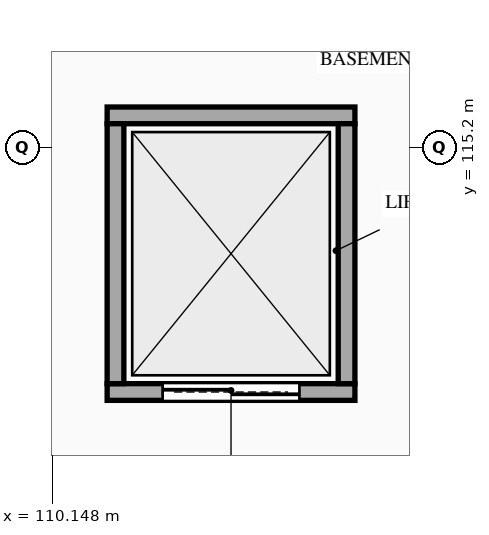
"""IFC4 building model, lengths in metres.
Left out: names, types, materials, properties, quantities, classifications, styles, units other than length and angle.
Written with IfcOpenShell. Run it as: python <this file> out.ifc"""

import sys

from ifc_helpers import new_model, si_unit, direction, frame, frame_2d, origin, place, context, subcontext, project, spatial, rectangle, extrude, element, fill, save


model = new_model("IFC4")
c1 = context("Model", 3, precision=1e-05, world=origin(), true_north=direction((0.0, 1.0)))
c2 = subcontext(c1, "Body", "Model", "MODEL_VIEW")
j1 = project(units=[si_unit("LENGTHUNIT", "METRE"), si_unit("PLANEANGLEUNIT", "RADIAN")], contexts=[c1])
p1 = place(None, origin())
s1 = spatial("IfcSite", under=j1, at=p1, CompositionType="ELEMENT")
p2 = place(p1, origin())
s2 = spatial("IfcBuilding", under=s1, at=p2, CompositionType="ELEMENT")
p3 = place(p2, frame((0.0, 0.0, -5.4)))
s3 = spatial("IfcBuildingStorey", under=s2, at=p3, CompositionType="ELEMENT", Elevation=-5.4)
p4 = place(p3, frame((110.87, 111.98, 0.0), z_axis=(0.0, 0.0, 1.0), x_axis=(1.0, 0.0, 0.0)))
e1 = element("IfcWall", 1, at=p4, inside=s3, PredefinedType="STANDARD", context=c2, shape_type="SweptSolid", body=[
    extrude(rectangle(XDim=3.26, YDim=0.22, at=frame_2d((1.63, 0.0))), origin(), (0.0, 0.0, 1.0), 4.95),
])
p5 = place(p4, frame((0.73, 0.0, 0.0)))
e2 = element("IfcOpeningElement", 2, at=p5, cuts=e1, PredefinedType="OPENING", context=c2, shape_type="SweptSolid", body=[
    extrude(rectangle(XDim=1.8, YDim=2.35, at=frame_2d((0.9, 1.175))), frame((0.0, 0.12, 0.0), z_axis=(0.0, -1.0, 0.0), x_axis=(1.0, 0.0, 0.0)), (0.0, 0.0, 1.0), 0.24),
])
p6 = place(p3, frame((114.13, 115.62, 0.0), z_axis=(0.0, 0.0, 1.0), x_axis=(-1.0, 0.0, 0.0)))
e3 = element("IfcWall", 3, at=p6, inside=s3, PredefinedType="STANDARD", context=c2, shape_type="SweptSolid", body=[
    extrude(rectangle(XDim=3.26, YDim=0.22, at=frame_2d((1.63, 0.0))), origin(), (0.0, 0.0, 1.0), 4.95),
])
for number, where, z_axis, x_axis in (
    (4, (110.98, 115.51, 0.0), (0.0, 0.0, 1.0), (0.0, -1.0, 0.0)),
    (5, (114.02, 112.09, 0.0), (0.0, 0.0, 1.0), (0.0, 1.0, 0.0)),
):
    element("IfcWall", number, at=place(p3, frame(where, z_axis=z_axis, x_axis=x_axis)), inside=s3, PredefinedType="STANDARD", context=c2, shape_type="SweptSolid", body=[
        extrude(rectangle(XDim=3.42, YDim=0.22, at=frame_2d((1.71, 0.0))), origin(), (0.0, 0.0, 1.0), 4.95),
    ])
p7 = place(p5, origin())
e6 = element("IfcDoor", 6, at=p7, inside=s3, OperationType="DOUBLE_DOOR_SLIDING", PredefinedType="DOOR", context=c2, shape_type="SweptSolid", body=[
    extrude(rectangle(XDim=1.8, YDim=2.35, at=frame_2d((0.9, 1.175))), frame((0.0, 0.025, 0.0), z_axis=(0.0, -1.0, 0.0), x_axis=(1.0, 0.0, 0.0)), (0.0, 0.0, 1.0), 0.05),
])
fill(e2, e6)
save(model, sys.argv[1])
